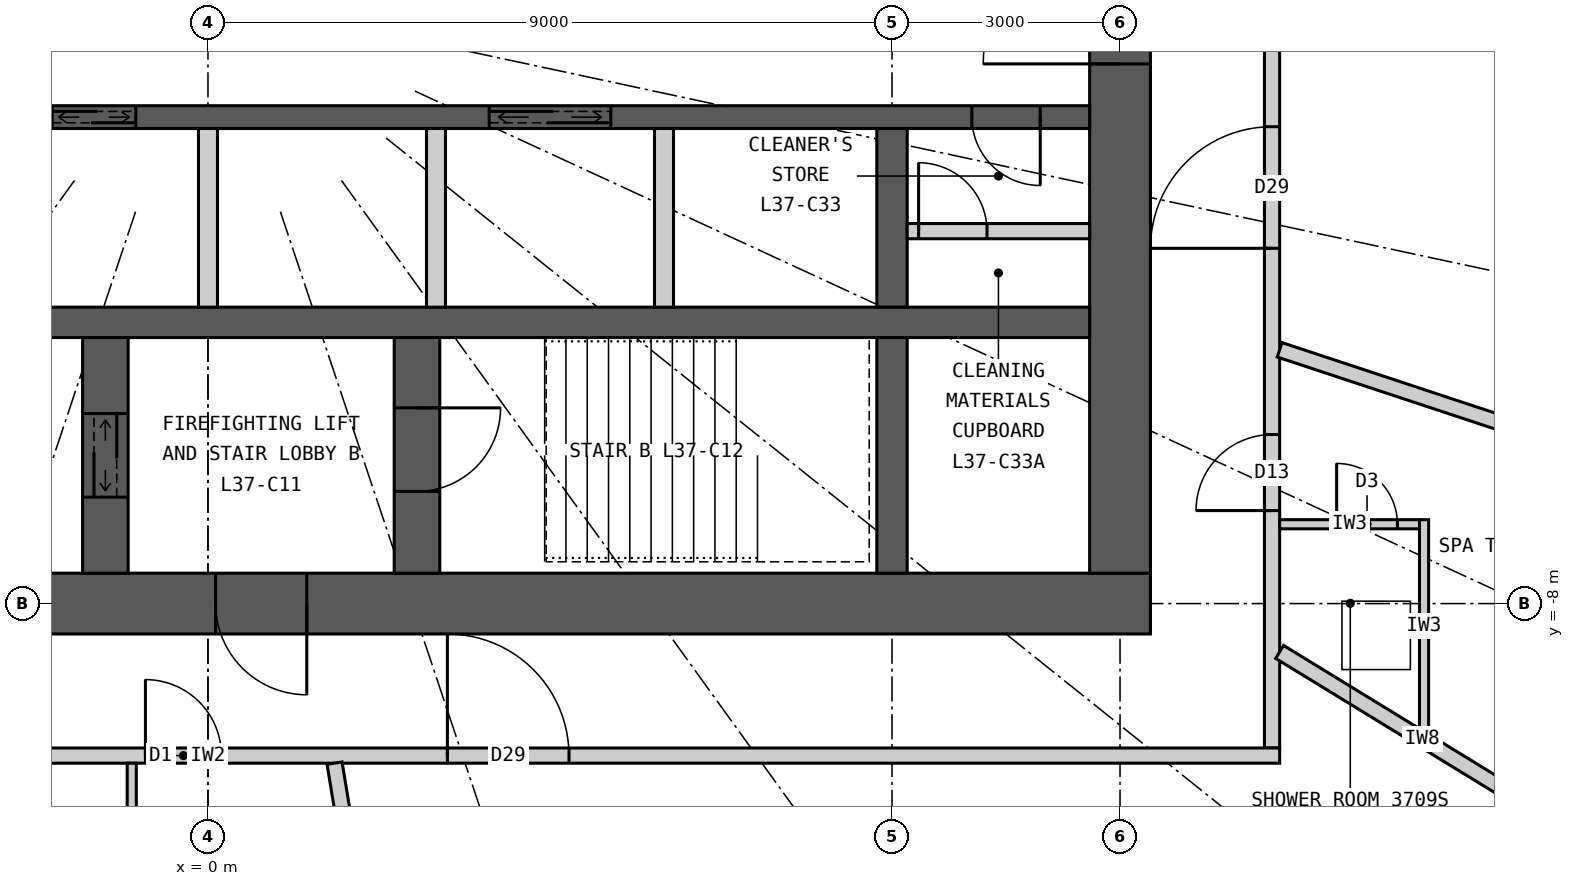
"""IFC4 building model, lengths in metres.
Left out: names, types, materials, properties, quantities, classifications, styles, units other than length and angle.
Written with IfcOpenShell. Run it as: python <this file> out.ifc"""

import sys

from ifc_helpers import new_model, si_unit, direction, frame, frame_2d, origin, place, context, subcontext, project, spatial, rectangle, extrude, element, fill, save


model = new_model("IFC4")
c1 = context("Model", 3, precision=1e-05, world=origin(), true_north=direction((0.0, 1.0)))
c2 = subcontext(c1, "Body", "Model", "MODEL_VIEW")
j1 = project(units=[si_unit("LENGTHUNIT", "METRE"), si_unit("PLANEANGLEUNIT", "RADIAN")], contexts=[c1])
p1 = place(None, origin())
s1 = spatial("IfcSite", under=j1, at=p1, CompositionType="ELEMENT")
p2 = place(p1, origin())
s2 = spatial("IfcBuilding", under=s1, at=p2, CompositionType="ELEMENT")
p3 = place(p2, frame((0.0, 0.0, 143.4)))
s3 = spatial("IfcBuildingStorey", under=s2, at=p3, CompositionType="ELEMENT", Elevation=143.4)
p4 = place(p3, frame((12.4, -8.0, 0.0), z_axis=(0.0, 0.0, 1.0), x_axis=(-1.0, 0.0, 0.0)))
e1 = element("IfcWall", 1, at=p4, inside=s3, PredefinedType="SHEAR", context=c2, shape_type="SweptSolid", body=[
    extrude(rectangle(XDim=24.8, YDim=0.8, at=frame_2d((12.4, 0.0))), origin(), (0.0, 0.0, 1.0), 3.3),
])
p5 = place(p4, frame((11.1, 0.0, 0.0)))
e2 = element("IfcOpeningElement", 2, at=p5, cuts=e1, PredefinedType="OPENING", context=c2, shape_type="SweptSolid", body=[
    extrude(rectangle(XDim=1.2, YDim=2.2, at=frame_2d((0.6, 1.1))), frame((0.0, 0.41, 0.0), z_axis=(0.0, -1.0, 0.0), x_axis=(1.0, 0.0, 0.0)), (0.0, 0.0, 1.0), 0.82),
])
p6 = place(p4, frame((18.7, 0.0, 0.0)))
e3 = element("IfcOpeningElement", 3, at=p6, cuts=e1, PredefinedType="OPENING", context=c2, shape_type="SweptSolid", body=[
    extrude(rectangle(XDim=0.9, YDim=2.2, at=frame_2d((0.45, 1.1))), frame((0.0, 0.41, 0.0), z_axis=(0.0, -1.0, 0.0), x_axis=(1.0, 0.0, 0.0)), (0.0, 0.0, 1.0), 0.82),
])
p7 = place(p3, frame((12.0, -7.6, 0.0), z_axis=(0.0, 0.0, 1.0), x_axis=(0.0, 1.0, 0.0)))
e4 = element("IfcWall", 4, at=p7, inside=s3, PredefinedType="SHEAR", context=c2, shape_type="SweptSolid", body=[
    extrude(rectangle(XDim=15.2, YDim=0.8, at=frame_2d((7.6, 0.0))), origin(), (0.0, 0.0, 1.0), 3.3),
])
p8 = place(p7, frame((6.7, 0.0, 0.0)))
e5 = element("IfcOpeningElement", 5, at=p8, cuts=e4, PredefinedType="OPENING", context=c2, shape_type="SweptSolid", body=[
    extrude(rectangle(XDim=1.8, YDim=2.2, at=frame_2d((0.9, 1.1))), frame((0.0, 0.41, 0.0), z_axis=(0.0, -1.0, 0.0), x_axis=(1.0, 0.0, 0.0)), (0.0, 0.0, 1.0), 0.82),
])
p9 = place(p3, frame((-11.6, -4.3, 0.0), z_axis=(0.0, 0.0, 1.0), x_axis=(1.0, 0.0, 0.0)))
e6 = element("IfcWall", 6, at=p9, inside=s3, PredefinedType="SHEAR", context=c2, shape_type="SweptSolid", body=[
    extrude(rectangle(XDim=23.2, YDim=0.4, at=frame_2d((11.6, 0.0))), origin(), (0.0, 0.0, 1.0), 3.3),
])
p10 = place(p3, frame((-11.6, -1.6, 0.0), z_axis=(0.0, 0.0, 1.0), x_axis=(1.0, 0.0, 0.0)))
e7 = element("IfcWall", 7, at=p10, inside=s3, PredefinedType="SHEAR", context=c2, shape_type="SweptSolid", body=[
    extrude(rectangle(XDim=23.2, YDim=0.3, at=frame_2d((11.6, 0.0))), origin(), (0.0, 0.0, 1.0), 3.3),
])
p11 = place(p10, frame((9.55, 0.0, 0.0)))
e8 = element("IfcOpeningElement", 8, at=p11, cuts=e7, PredefinedType="OPENING", context=c2, shape_type="SweptSolid", body=[
    extrude(rectangle(XDim=1.1, YDim=2.2, at=frame_2d((0.55, 1.1))), frame((0.0, 0.16, 0.0), z_axis=(0.0, -1.0, 0.0), x_axis=(1.0, 0.0, 0.0)), (0.0, 0.0, 1.0), 0.32),
])
p12 = place(p10, frame((15.3, 0.0, 0.0)))
e9 = element("IfcOpeningElement", 9, at=p12, cuts=e7, PredefinedType="OPENING", context=c2, shape_type="SweptSolid", body=[
    extrude(rectangle(XDim=1.6, YDim=2.4, at=frame_2d((0.8, 1.2))), frame((0.0, 0.16, 0.0), z_axis=(0.0, -1.0, 0.0), x_axis=(1.0, 0.0, 0.0)), (0.0, 0.0, 1.0), 0.32),
])
p13 = place(p10, frame((0.65, 0.0, 0.0)))
e10 = element("IfcOpeningElement", 10, at=p13, cuts=e7, PredefinedType="OPENING", context=c2, shape_type="SweptSolid", body=[
    extrude(rectangle(XDim=0.9, YDim=2.2, at=frame_2d((0.45, 1.1))), frame((0.0, 0.16, 0.0), z_axis=(0.0, -1.0, 0.0), x_axis=(1.0, 0.0, 0.0)), (0.0, 0.0, 1.0), 0.32),
])
p14 = place(p10, frame((5.15, 0.0, 0.0)))
e11 = element("IfcOpeningElement", 11, at=p14, cuts=e7, PredefinedType="OPENING", context=c2, shape_type="SweptSolid", body=[
    extrude(rectangle(XDim=0.9, YDim=2.2, at=frame_2d((0.45, 1.1))), frame((0.0, 0.16, 0.0), z_axis=(0.0, -1.0, 0.0), x_axis=(1.0, 0.0, 0.0)), (0.0, 0.0, 1.0), 0.32),
])
p15 = place(p10, frame((21.65, 0.0, 0.0)))
e12 = element("IfcOpeningElement", 12, at=p15, cuts=e7, PredefinedType="OPENING", context=c2, shape_type="SweptSolid", body=[
    extrude(rectangle(XDim=0.9, YDim=2.2, at=frame_2d((0.45, 1.1))), frame((0.0, 0.16, 0.0), z_axis=(0.0, -1.0, 0.0), x_axis=(1.0, 0.0, 0.0)), (0.0, 0.0, 1.0), 0.32),
])
p16 = place(p3, frame((9.0, -4.1, 0.0), z_axis=(0.0, 0.0, 1.0), x_axis=(0.0, 1.0, 0.0)))
e13 = element("IfcWall", 13, at=p16, inside=s3, PredefinedType="SHEAR", context=c2, shape_type="SweptSolid", body=[
    extrude(rectangle(XDim=2.35, YDim=0.4, at=frame_2d((1.175, 0.0))), origin(), (0.0, 0.0, 1.0), 3.3),
])
p17 = place(p3, frame((9.0, -7.6, 0.0), z_axis=(0.0, 0.0, 1.0), x_axis=(0.0, 1.0, 0.0)))
e14 = element("IfcWall", 14, at=p17, inside=s3, PredefinedType="SHEAR", context=c2, shape_type="SweptSolid", body=[
    extrude(rectangle(XDim=3.1, YDim=0.4, at=frame_2d((1.55, 0.0))), origin(), (0.0, 0.0, 1.0), 3.3),
])
p18 = place(p3, frame((2.75, -7.6, 0.0), z_axis=(0.0, 0.0, 1.0), x_axis=(0.0, 1.0, 0.0)))
e15 = element("IfcWall", 15, at=p18, inside=s3, PredefinedType="SHEAR", context=c2, shape_type="SweptSolid", body=[
    extrude(rectangle(XDim=3.1, YDim=0.6, at=frame_2d((1.55, 0.0))), origin(), (0.0, 0.0, 1.0), 3.3),
])
p19 = place(p18, frame((1.075, 0.0, 0.0)))
e16 = element("IfcOpeningElement", 16, at=p19, cuts=e15, PredefinedType="OPENING", context=c2, shape_type="SweptSolid", body=[
    extrude(rectangle(XDim=1.1, YDim=2.2, at=frame_2d((0.55, 1.1))), frame((0.0, 0.31, 0.0), z_axis=(0.0, -1.0, 0.0), x_axis=(1.0, 0.0, 0.0)), (0.0, 0.0, 1.0), 0.62),
])
p20 = place(p3, frame((-1.35, -7.6, 0.0), z_axis=(0.0, 0.0, 1.0), x_axis=(0.0, 1.0, 0.0)))
e17 = element("IfcWall", 17, at=p20, inside=s3, PredefinedType="SHEAR", context=c2, shape_type="SweptSolid", body=[
    extrude(rectangle(XDim=3.1, YDim=0.6, at=frame_2d((1.55, 0.0))), origin(), (0.0, 0.0, 1.0), 3.3),
])
p21 = place(p20, frame((1.0, 0.0, 0.0)))
e18 = element("IfcOpeningElement", 18, at=p21, cuts=e17, PredefinedType="OPENING", context=c2, shape_type="SweptSolid", body=[
    extrude(rectangle(XDim=1.1, YDim=2.2, at=frame_2d((0.55, 1.1))), frame((0.0, 0.31, 0.0), z_axis=(0.0, -1.0, 0.0), x_axis=(1.0, 0.0, 0.0)), (0.0, 0.0, 1.0), 0.62),
])
for number, where, z_axis, x_axis in (
    (19, (0.0, -4.1, 0.0), (0.0, 0.0, 1.0), (0.0, 1.0, 0.0)),
    (20, (3.0, -4.1, 0.0), (0.0, 0.0, 1.0), (0.0, 1.0, 0.0)),
    (21, (6.0, -4.1, 0.0), (0.0, 0.0, 1.0), (0.0, 1.0, 0.0)),
):
    element("IfcWall", number, at=place(p3, frame(where, z_axis=z_axis, x_axis=x_axis)), inside=s3, PredefinedType="PARTITIONING", context=c2, shape_type="SweptSolid", body=[
        extrude(rectangle(XDim=2.35, YDim=0.25, at=frame_2d((1.175, 0.0))), origin(), (0.0, 0.0, 1.0), 3.3),
    ])
p22 = place(p3, frame((16.095, -12.876, 0.0), z_axis=(0.0, 0.0, 1.0), x_axis=(0.700727467776, 0.71342905457, 0.0)))
e22 = element("IfcWall", 22, at=p22, inside=s3, PredefinedType="ELEMENTEDWALL", context=c2, shape_type="SweptSolid", body=[
    extrude(rectangle(XDim=5.247, YDim=0.15, at=frame_2d((2.624, 0.0))), origin(), (0.0, 0.0, 1.0), 3.12),
])
p23 = place(p22, frame((0.924, 0.0, 0.9)))
e23 = element("IfcOpeningElement", 23, at=p23, cuts=e22, PredefinedType="OPENING", context=c2, shape_type="SweptSolid", body=[
    extrude(rectangle(XDim=1.4, YDim=1.9, at=frame_2d((0.7, 0.95))), frame((0.0, 0.085, 0.0), z_axis=(0.0, -1.0, 0.0), x_axis=(1.0, 0.0, 0.0)), (0.0, 0.0, 1.0), 0.17),
])
p24 = place(p22, frame((2.924, 0.0, 0.9)))
e24 = element("IfcOpeningElement", 24, at=p24, cuts=e22, PredefinedType="OPENING", context=c2, shape_type="SweptSolid", body=[
    extrude(rectangle(XDim=1.4, YDim=1.9, at=frame_2d((0.7, 0.95))), frame((0.0, 0.085, 0.0), z_axis=(0.0, -1.0, 0.0), x_axis=(1.0, 0.0, 0.0)), (0.0, 0.0, 1.0), 0.17),
])
p25 = place(p3, frame((14.0, -9.9, 0.0), z_axis=(0.0, 0.0, 1.0), x_axis=(0.0, 1.0, 0.0)))
e25 = element("IfcWall", 25, at=p25, inside=s3, PredefinedType="PARTITIONING", context=c2, shape_type="SweptSolid", body=[
    extrude(rectangle(XDim=19.8, YDim=0.2, at=frame_2d((9.9, 0.0))), origin(), (0.0, 0.0, 1.0), 3.12),
])
p26 = place(p25, frame((3.124, 0.0, 0.0)))
e26 = element("IfcOpeningElement", 26, at=p26, cuts=e25, PredefinedType="OPENING", context=c2, shape_type="SweptSolid", body=[
    extrude(rectangle(XDim=1.0, YDim=2.2, at=frame_2d((0.5, 1.1))), frame((0.0, 0.11, 0.0), z_axis=(0.0, -1.0, 0.0), x_axis=(1.0, 0.0, 0.0)), (0.0, 0.0, 1.0), 0.22),
])
p27 = place(p25, frame((6.574, 0.0, 0.0)))
e27 = element("IfcOpeningElement", 27, at=p27, cuts=e25, PredefinedType="OPENING", context=c2, shape_type="SweptSolid", body=[
    extrude(rectangle(XDim=1.6, YDim=2.4, at=frame_2d((0.8, 1.2))), frame((0.0, 0.11, 0.0), z_axis=(0.0, -1.0, 0.0), x_axis=(1.0, 0.0, 0.0)), (0.0, 0.0, 1.0), 0.22),
])
p28 = place(p25, frame((17.701, 0.0, 0.0)))
e28 = element("IfcOpeningElement", 28, at=p28, cuts=e25, PredefinedType="OPENING", context=c2, shape_type="SweptSolid", body=[
    extrude(rectangle(XDim=1.0, YDim=2.2, at=frame_2d((0.5, 1.1))), frame((0.0, 0.11, 0.0), z_axis=(0.0, -1.0, 0.0), x_axis=(1.0, 0.0, 0.0)), (0.0, 0.0, 1.0), 0.22),
])
p29 = place(p3, frame((14.1, -10.0, 0.0), z_axis=(0.0, 0.0, 1.0), x_axis=(-1.0, 0.0, 0.0)))
e29 = element("IfcWall", 29, at=p29, inside=s3, PredefinedType="PARTITIONING", context=c2, shape_type="SweptSolid", body=[
    extrude(rectangle(XDim=28.2, YDim=0.2, at=frame_2d((14.1, 0.0))), origin(), (0.0, 0.0, 1.0), 3.12),
])
p30 = place(p29, frame((23.045, 0.0, 0.0)))
e30 = element("IfcOpeningElement", 30, at=p30, cuts=e29, PredefinedType="OPENING", context=c2, shape_type="SweptSolid", body=[
    extrude(rectangle(XDim=1.0, YDim=2.2, at=frame_2d((0.5, 1.1))), frame((0.0, 0.11, 0.0), z_axis=(0.0, -1.0, 0.0), x_axis=(1.0, 0.0, 0.0)), (0.0, 0.0, 1.0), 0.22),
])
p31 = place(p29, frame((18.529, 0.0, 0.0)))
e31 = element("IfcOpeningElement", 31, at=p31, cuts=e29, PredefinedType="OPENING", context=c2, shape_type="SweptSolid", body=[
    extrude(rectangle(XDim=1.0, YDim=2.2, at=frame_2d((0.5, 1.1))), frame((0.0, 0.11, 0.0), z_axis=(0.0, -1.0, 0.0), x_axis=(1.0, 0.0, 0.0)), (0.0, 0.0, 1.0), 0.22),
])
p32 = place(p29, frame((13.923, 0.0, 0.0)))
e32 = element("IfcOpeningElement", 32, at=p32, cuts=e29, PredefinedType="OPENING", context=c2, shape_type="SweptSolid", body=[
    extrude(rectangle(XDim=1.0, YDim=2.2, at=frame_2d((0.5, 1.1))), frame((0.0, 0.11, 0.0), z_axis=(0.0, -1.0, 0.0), x_axis=(1.0, 0.0, 0.0)), (0.0, 0.0, 1.0), 0.22),
])
p33 = place(p29, frame((9.35, 0.0, 0.0)))
e33 = element("IfcOpeningElement", 33, at=p33, cuts=e29, PredefinedType="OPENING", context=c2, shape_type="SweptSolid", body=[
    extrude(rectangle(XDim=1.6, YDim=2.4, at=frame_2d((0.8, 1.2))), frame((0.0, 0.11, 0.0), z_axis=(0.0, -1.0, 0.0), x_axis=(1.0, 0.0, 0.0)), (0.0, 0.0, 1.0), 0.22),
])
p34 = place(p3, frame((1.666, -10.1, 0.0), z_axis=(0.0, 0.0, 1.0), x_axis=(0.162669562982, -0.986680603478, 0.0)))
e34 = element("IfcWall", 34, at=p34, inside=s3, PredefinedType="PARTITIONING", context=c2, shape_type="SweptSolid", body=[
    extrude(rectangle(XDim=7.716, YDim=0.2, at=frame_2d((3.858, 0.0))), origin(), (0.0, 0.0, 1.0), 3.12),
])
p35 = place(p3, frame((14.1, -8.636, 0.0), z_axis=(0.0, 0.0, 1.0), x_axis=(0.852731884196, -0.522348862041, 0.0)))
e35 = element("IfcWall", 35, at=p35, inside=s3, PredefinedType="PARTITIONING", context=c2, shape_type="SweptSolid", body=[
    extrude(rectangle(XDim=4.404, YDim=0.2, at=frame_2d((2.202, 0.0))), origin(), (0.0, 0.0, 1.0), 3.12),
])
p36 = place(p3, frame((14.1, -4.661, 0.0), z_axis=(0.0, 0.0, 1.0), x_axis=(0.949453216399, -0.313908569285, 0.0)))
e36 = element("IfcWall", 36, at=p36, inside=s3, PredefinedType="PARTITIONING", context=c2, shape_type="SweptSolid", body=[
    extrude(rectangle(XDim=7.109, YDim=0.2, at=frame_2d((3.554, 0.0))), origin(), (0.0, 0.0, 1.0), 3.12),
])
p37 = place(p3, frame((-1.003, -10.1, 0.0), z_axis=(0.0, 0.0, 1.0), x_axis=(0.0, -1.0, 0.0)))
e37 = element("IfcWall", 37, at=p37, inside=s3, PredefinedType="PARTITIONING", context=c2, shape_type="SweptSolid", body=[
    extrude(rectangle(XDim=2.54, YDim=0.12, at=frame_2d((1.27, 0.0))), origin(), (0.0, 0.0, 1.0), 3.12),
])
p38 = place(p37, frame((0.75, 0.0, 0.0)))
e38 = element("IfcOpeningElement", 38, at=p38, cuts=e37, PredefinedType="OPENING", context=c2, shape_type="SweptSolid", body=[
    extrude(rectangle(XDim=0.8, YDim=2.1, at=frame_2d((0.4, 1.05))), frame((0.0, 0.07, 0.0), z_axis=(0.0, -1.0, 0.0), x_axis=(1.0, 0.0, 0.0)), (0.0, 0.0, 1.0), 0.14),
])
p39 = place(p3, frame((16.0, -9.7, 0.0), z_axis=(0.0, 0.0, 1.0), x_axis=(0.0, 1.0, 0.0)))
e39 = element("IfcWall", 39, at=p39, inside=s3, PredefinedType="PARTITIONING", context=c2, shape_type="SweptSolid", body=[
    extrude(rectangle(XDim=2.804, YDim=0.12, at=frame_2d((1.402, 0.0))), origin(), (0.0, 0.0, 1.0), 3.12),
])
p40 = place(p3, frame((14.1, -6.956, 0.0), z_axis=(0.0, 0.0, 1.0), x_axis=(1.0, 0.0, 0.0)))
e40 = element("IfcWall", 40, at=p40, inside=s3, PredefinedType="PARTITIONING", context=c2, shape_type="SweptSolid", body=[
    extrude(rectangle(XDim=1.84, YDim=0.12, at=frame_2d((0.92, 0.0))), origin(), (0.0, 0.0, 1.0), 3.12),
])
p41 = place(p40, frame((0.75, 0.0, 0.0)))
e41 = element("IfcOpeningElement", 41, at=p41, cuts=e40, PredefinedType="OPENING", context=c2, shape_type="SweptSolid", body=[
    extrude(rectangle(XDim=0.8, YDim=2.1, at=frame_2d((0.4, 1.05))), frame((0.0, 0.07, 0.0), z_axis=(0.0, -1.0, 0.0), x_axis=(1.0, 0.0, 0.0)), (0.0, 0.0, 1.0), 0.14),
])
p42 = place(p3, frame((9.2, -3.1, 0.0), z_axis=(0.0, 0.0, 1.0), x_axis=(1.0, 0.0, 0.0)))
e42 = element("IfcWall", 42, at=p42, inside=s3, PredefinedType="PARTITIONING", context=c2, shape_type="SweptSolid", body=[
    extrude(rectangle(XDim=2.4, YDim=0.2, at=frame_2d((1.2, 0.0))), origin(), (0.0, 0.0, 1.0), 3.12),
])
p43 = place(p42, frame((0.15, 0.0, 0.0)))
e43 = element("IfcOpeningElement", 43, at=p43, cuts=e42, PredefinedType="OPENING", context=c2, shape_type="SweptSolid", body=[
    extrude(rectangle(XDim=0.9, YDim=2.2, at=frame_2d((0.45, 1.1))), frame((0.0, 0.11, 0.0), z_axis=(0.0, -1.0, 0.0), x_axis=(1.0, 0.0, 0.0)), (0.0, 0.0, 1.0), 0.22),
])
p44 = place(p32, origin())
e44 = element("IfcDoor", 44, at=p44, inside=s3, OperationType="SINGLE_SWING_RIGHT", PredefinedType="DOOR", context=c2, shape_type="SweptSolid", body=[
    extrude(rectangle(XDim=1.0, YDim=2.2, at=frame_2d((0.5, 1.1))), frame((0.0, 0.025, 0.0), z_axis=(0.0, -1.0, 0.0), x_axis=(1.0, 0.0, 0.0)), (0.0, 0.0, 1.0), 0.05),
])
fill(e32, e44)
p45 = place(p33, origin())
e45 = element("IfcDoor", 45, at=p45, inside=s3, OperationType="DOUBLE_DOOR_DOUBLE_SWING", PredefinedType="DOOR", context=c2, shape_type="SweptSolid", body=[
    extrude(rectangle(XDim=1.6, YDim=2.4, at=frame_2d((0.8, 1.2))), frame((0.0, 0.025, 0.0), z_axis=(0.0, -1.0, 0.0), x_axis=(1.0, 0.0, 0.0)), (0.0, 0.0, 1.0), 0.05),
])
fill(e33, e45)
p46 = place(p41, origin())
e46 = element("IfcDoor", 46, at=p46, inside=s3, OperationType="SINGLE_SWING_LEFT", PredefinedType="DOOR", context=c2, shape_type="SweptSolid", body=[
    extrude(rectangle(XDim=0.8, YDim=2.1, at=frame_2d((0.4, 1.05))), frame((0.0, 0.025, 0.0), z_axis=(0.0, -1.0, 0.0), x_axis=(1.0, 0.0, 0.0)), (0.0, 0.0, 1.0), 0.05),
])
fill(e41, e46)
p47 = place(p26, origin())
e47 = element("IfcDoor", 47, at=p47, inside=s3, OperationType="SINGLE_SWING_LEFT", PredefinedType="DOOR", context=c2, shape_type="SweptSolid", body=[
    extrude(rectangle(XDim=1.0, YDim=2.2, at=frame_2d((0.5, 1.1))), frame((0.0, 0.025, 0.0), z_axis=(0.0, -1.0, 0.0), x_axis=(1.0, 0.0, 0.0)), (0.0, 0.0, 1.0), 0.05),
])
fill(e26, e47)
p48 = place(p27, origin())
e48 = element("IfcDoor", 48, at=p48, inside=s3, OperationType="DOUBLE_DOOR_DOUBLE_SWING", PredefinedType="DOOR", context=c2, shape_type="SweptSolid", body=[
    extrude(rectangle(XDim=1.6, YDim=2.4, at=frame_2d((0.8, 1.2))), frame((0.0, 0.025, 0.0), z_axis=(0.0, -1.0, 0.0), x_axis=(1.0, 0.0, 0.0)), (0.0, 0.0, 1.0), 0.05),
])
fill(e27, e48)
p49 = place(p5, origin())
e49 = element("IfcDoor", 49, at=p49, inside=s3, OperationType="SINGLE_SWING_LEFT", PredefinedType="DOOR", context=c2, shape_type="SweptSolid", body=[
    extrude(rectangle(XDim=1.2, YDim=2.2, at=frame_2d((0.6, 1.1))), frame((0.0, 0.025, 0.0), z_axis=(0.0, -1.0, 0.0), x_axis=(1.0, 0.0, 0.0)), (0.0, 0.0, 1.0), 0.05),
])
fill(e2, e49)
p50 = place(p19, origin())
e50 = element("IfcDoor", 50, at=p50, inside=s3, OperationType="SINGLE_SWING_RIGHT", PredefinedType="DOOR", context=c2, shape_type="SweptSolid", body=[
    extrude(rectangle(XDim=1.1, YDim=2.2, at=frame_2d((0.55, 1.1))), frame((0.0, 0.025, 0.0), z_axis=(0.0, -1.0, 0.0), x_axis=(1.0, 0.0, 0.0)), (0.0, 0.0, 1.0), 0.05),
])
fill(e16, e50)
p51 = place(p21, origin())
e51 = element("IfcDoor", 51, at=p51, inside=s3, OperationType="DOUBLE_DOOR_SLIDING", PredefinedType="DOOR", context=c2, shape_type="SweptSolid", body=[
    extrude(rectangle(XDim=1.1, YDim=2.2, at=frame_2d((0.55, 1.1))), frame((0.0, 0.025, 0.0), z_axis=(0.0, -1.0, 0.0), x_axis=(1.0, 0.0, 0.0)), (0.0, 0.0, 1.0), 0.05),
])
fill(e18, e51)
p52 = place(p11, origin())
e52 = element("IfcDoor", 52, at=p52, inside=s3, OperationType="DOUBLE_DOOR_SLIDING", PredefinedType="DOOR", context=c2, shape_type="SweptSolid", body=[
    extrude(rectangle(XDim=1.1, YDim=2.2, at=frame_2d((0.55, 1.1))), frame((0.0, 0.025, 0.0), z_axis=(0.0, -1.0, 0.0), x_axis=(1.0, 0.0, 0.0)), (0.0, 0.0, 1.0), 0.05),
])
fill(e8, e52)
p53 = place(p12, origin())
e53 = element("IfcDoor", 53, at=p53, inside=s3, OperationType="DOUBLE_DOOR_SLIDING", PredefinedType="DOOR", context=c2, shape_type="SweptSolid", body=[
    extrude(rectangle(XDim=1.6, YDim=2.4, at=frame_2d((0.8, 1.2))), frame((0.0, 0.025, 0.0), z_axis=(0.0, -1.0, 0.0), x_axis=(1.0, 0.0, 0.0)), (0.0, 0.0, 1.0), 0.05),
])
fill(e9, e53)
p54 = place(p43, origin())
e54 = element("IfcDoor", 54, at=p54, inside=s3, OperationType="SINGLE_SWING_LEFT", PredefinedType="DOOR", context=c2, shape_type="SweptSolid", body=[
    extrude(rectangle(XDim=0.9, YDim=2.2, at=frame_2d((0.45, 1.1))), frame((0.0, 0.025, 0.0), z_axis=(0.0, -1.0, 0.0), x_axis=(1.0, 0.0, 0.0)), (0.0, 0.0, 1.0), 0.05),
])
fill(e43, e54)
p55 = place(p15, origin())
e55 = element("IfcDoor", 55, at=p55, inside=s3, OperationType="SINGLE_SWING_RIGHT", PredefinedType="DOOR", context=c2, shape_type="SweptSolid", body=[
    extrude(rectangle(XDim=0.9, YDim=2.2, at=frame_2d((0.45, 1.1))), frame((0.0, 0.025, 0.0), z_axis=(0.0, -1.0, 0.0), x_axis=(1.0, 0.0, 0.0)), (0.0, 0.0, 1.0), 0.05),
])
fill(e12, e55)
p56 = place(p8, origin())
e56 = element("IfcDoor", 56, at=p56, inside=s3, OperationType="DOUBLE_DOOR_DOUBLE_SWING", PredefinedType="DOOR", context=c2, shape_type="SweptSolid", body=[
    extrude(rectangle(XDim=1.8, YDim=2.2, at=frame_2d((0.9, 1.1))), frame((0.0, 0.025, 0.0), z_axis=(0.0, -1.0, 0.0), x_axis=(1.0, 0.0, 0.0)), (0.0, 0.0, 1.0), 0.05),
])
fill(e5, e56)
save(model, sys.argv[1])
